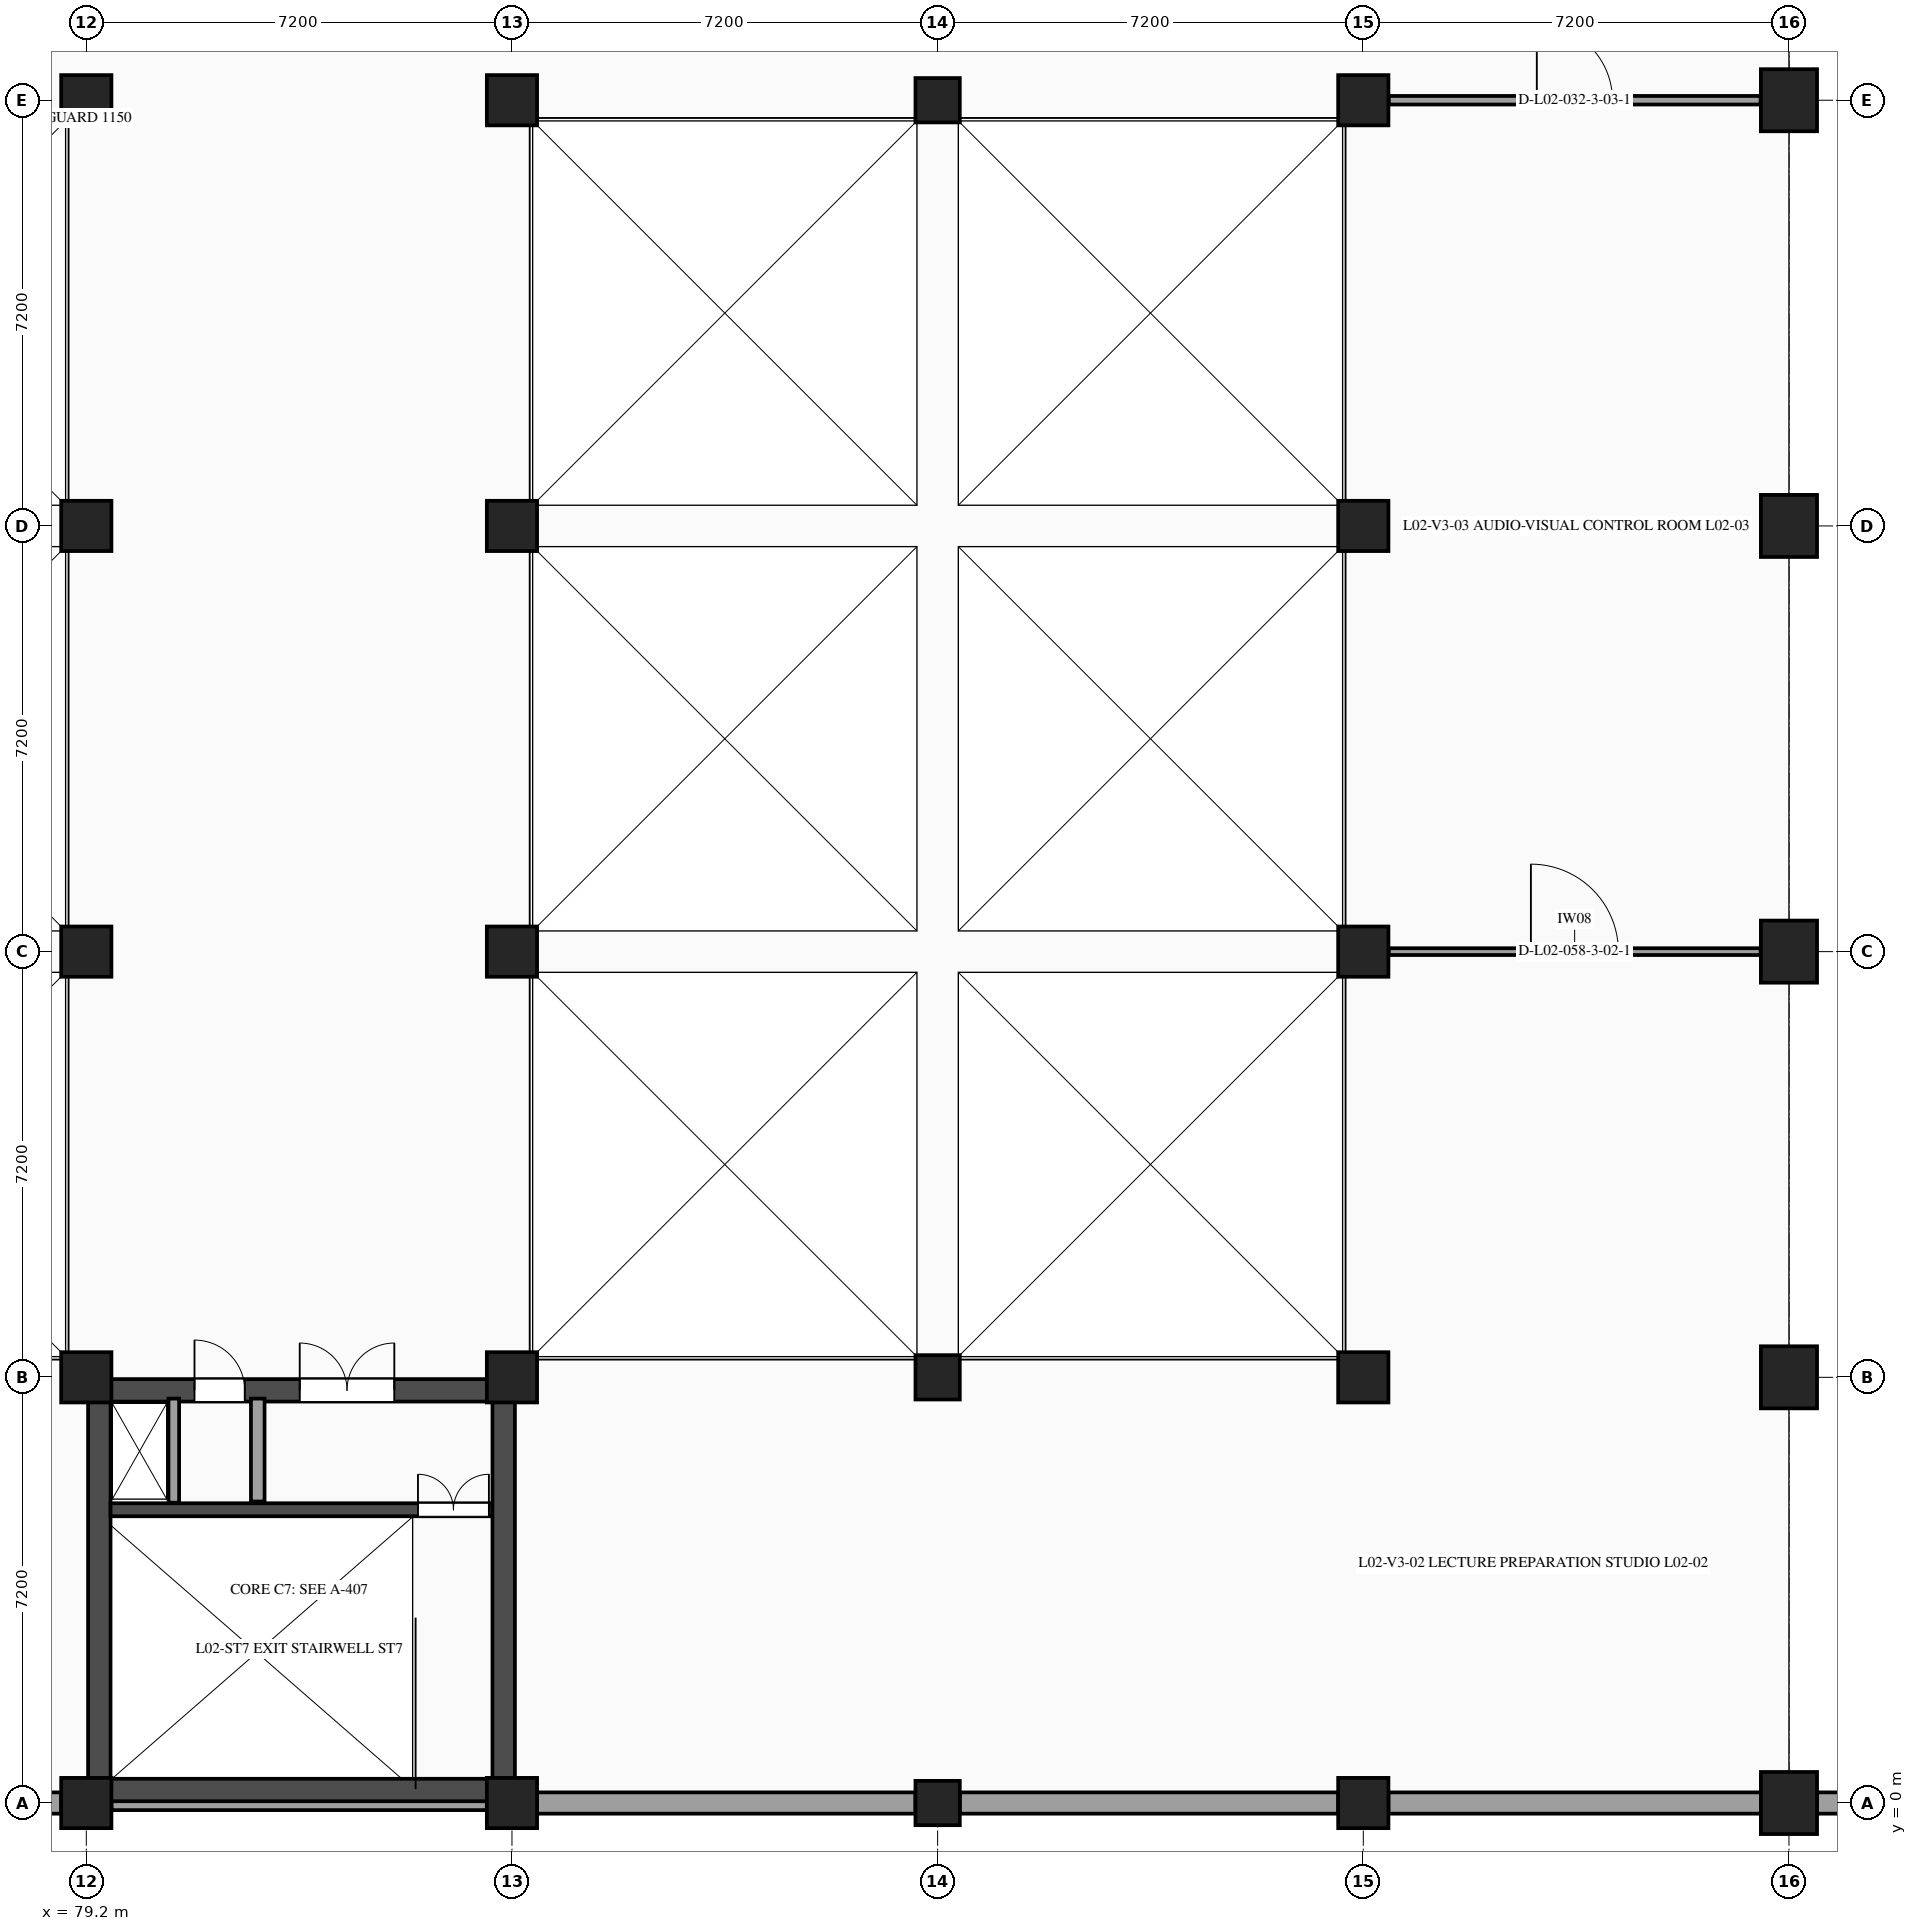
"""IFC4 building model, lengths in metres.
Left out: names, types, materials, properties, quantities, classifications, styles, units other than length and angle.
Written with IfcOpenShell. Run it as: python <this file> out.ifc"""

import sys

from ifc_helpers import new_model, si_unit, direction, frame, frame_2d, origin, origin_2d, place, context, subcontext, project, spatial, rectangle, extrude, element, fill, save


model = new_model("IFC4")
c1 = context("Model", 3, precision=1e-05, world=origin(), true_north=direction((0.0, 1.0)))
c2 = subcontext(c1, "Body", "Model", "MODEL_VIEW")
j1 = project(units=[si_unit("LENGTHUNIT", "METRE"), si_unit("PLANEANGLEUNIT", "RADIAN")], contexts=[c1])
p1 = place(None, origin())
s1 = spatial("IfcSite", under=j1, at=p1, CompositionType="ELEMENT")
p2 = place(p1, origin())
s2 = spatial("IfcBuilding", under=s1, at=p2, CompositionType="ELEMENT")
p3 = place(p2, frame((0.0, 0.0, 9.9)))
s3 = spatial("IfcBuildingStorey", under=s2, at=p3, CompositionType="ELEMENT", Elevation=9.9)
for number, where, z_axis, x_axis in (
    (1, (79.2, 0.0, 0.0), (0.0, 0.0, 1.0), (1.0, 0.0, 0.0)),
    (2, (79.2, 7.2, 0.0), (0.0, 0.0, 1.0), (1.0, 0.0, 0.0)),
    (3, (79.2, 14.4, 0.0), (0.0, 0.0, 1.0), (1.0, 0.0, 0.0)),
    (4, (79.2, 21.6, 0.0), (0.0, 0.0, 1.0), (1.0, 0.0, 0.0)),
    (5, (79.2, 28.8, 0.0), (0.0, 0.0, 1.0), (1.0, 0.0, 0.0)),
    (6, (86.4, 0.0, 0.0), (0.0, 0.0, 1.0), (1.0, 0.0, 0.0)),
    (7, (86.4, 7.2, 0.0), (0.0, 0.0, 1.0), (1.0, 0.0, 0.0)),
    (8, (86.4, 14.4, 0.0), (0.0, 0.0, 1.0), (1.0, 0.0, 0.0)),
    (9, (86.4, 21.6, 0.0), (0.0, 0.0, 1.0), (1.0, 0.0, 0.0)),
    (10, (86.4, 28.8, 0.0), (0.0, 0.0, 1.0), (1.0, 0.0, 0.0)),
):
    element("IfcColumn", number, at=place(p3, frame(where, z_axis=z_axis, x_axis=x_axis)), inside=s3, PredefinedType="COLUMN", context=c2, shape_type="SweptSolid", body=[
        extrude(rectangle(XDim=0.85, YDim=0.85, at=origin_2d()), origin(), (0.0, 0.0, 1.0), 4.5),
    ])
for number, where, z_axis, x_axis in (
    (11, (93.6, 0.0, 0.0), (0.0, 0.0, 1.0), (1.0, 0.0, 0.0)),
    (12, (93.6, 7.2, 0.0), (0.0, 0.0, 1.0), (1.0, 0.0, 0.0)),
    (13, (93.6, 28.8, 0.0), (0.0, 0.0, 1.0), (1.0, 0.0, 0.0)),
):
    element("IfcColumn", number, at=place(p3, frame(where, z_axis=z_axis, x_axis=x_axis)), inside=s3, PredefinedType="COLUMN", context=c2, shape_type="SweptSolid", body=[
        extrude(rectangle(XDim=0.75, YDim=0.75, at=origin_2d()), origin(), (0.0, 0.0, 1.0), 4.5),
    ])
for number, where, z_axis, x_axis in (
    (14, (100.8, 0.0, 0.0), (0.0, 0.0, 1.0), (1.0, 0.0, 0.0)),
    (15, (100.8, 7.2, 0.0), (0.0, 0.0, 1.0), (1.0, 0.0, 0.0)),
    (16, (100.8, 14.4, 0.0), (0.0, 0.0, 1.0), (1.0, 0.0, 0.0)),
    (17, (100.8, 21.6, 0.0), (0.0, 0.0, 1.0), (1.0, 0.0, 0.0)),
    (18, (100.8, 28.8, 0.0), (0.0, 0.0, 1.0), (1.0, 0.0, 0.0)),
):
    element("IfcColumn", number, at=place(p3, frame(where, z_axis=z_axis, x_axis=x_axis)), inside=s3, PredefinedType="COLUMN", context=c2, shape_type="SweptSolid", body=[
        extrude(rectangle(XDim=0.85, YDim=0.85, at=origin_2d()), origin(), (0.0, 0.0, 1.0), 4.5),
    ])
for number, where, z_axis, x_axis in (
    (19, (108.0, 0.0, 0.0), (0.0, 0.0, 1.0), (1.0, 0.0, 0.0)),
    (20, (108.0, 7.2, 0.0), (0.0, 0.0, 1.0), (1.0, 0.0, 0.0)),
    (21, (108.0, 14.4, 0.0), (0.0, 0.0, 1.0), (1.0, 0.0, 0.0)),
    (22, (108.0, 21.6, 0.0), (0.0, 0.0, 1.0), (1.0, 0.0, 0.0)),
    (23, (108.0, 28.8, 0.0), (0.0, 0.0, 1.0), (1.0, 0.0, 0.0)),
):
    element("IfcColumn", number, at=place(p3, frame(where, z_axis=z_axis, x_axis=x_axis)), inside=s3, PredefinedType="COLUMN", context=c2, shape_type="SweptSolid", body=[
        extrude(rectangle(XDim=0.95, YDim=1.05, at=origin_2d()), origin(), (0.0, 0.0, 1.0), 4.5),
    ])
p4 = place(p3, frame((114.7, 0.0, 0.0), z_axis=(0.0, 0.0, 1.0), x_axis=(-1.0, 0.0, 0.0)))
e24 = element("IfcWall", 24, at=p4, inside=s3, PredefinedType="STANDARD", context=c2, shape_type="SweptSolid", body=[
    extrude(rectangle(XDim=6.225, YDim=0.36, at=frame_2d((3.112, 0.0))), origin(), (0.0, 0.0, 1.0), 3.745),
])
p5 = place(p4, frame((0.413, 0.0, 1.05)))
e25 = element("IfcOpeningElement", 25, at=p5, cuts=e24, PredefinedType="OPENING", context=c2, shape_type="SweptSolid", body=[
    extrude(rectangle(XDim=5.4, YDim=1.9, at=frame_2d((2.7, 0.95))), frame((0.0, 0.19, 0.0), z_axis=(0.0, -1.0, 0.0), x_axis=(1.0, 0.0, 0.0)), (0.0, 0.0, 1.0), 0.38),
])
p6 = place(p3, frame((107.525, 0.0, 0.0), z_axis=(0.0, 0.0, 1.0), x_axis=(-1.0, 0.0, 0.0)))
e26 = element("IfcWall", 26, at=p6, inside=s3, PredefinedType="STANDARD", context=c2, shape_type="SweptSolid", body=[
    extrude(rectangle(XDim=6.3, YDim=0.36, at=frame_2d((3.15, 0.0))), origin(), (0.0, 0.0, 1.0), 3.745),
])
p7 = place(p3, frame((100.375, 0.0, 0.0), z_axis=(0.0, 0.0, 1.0), x_axis=(-1.0, 0.0, 0.0)))
e27 = element("IfcWall", 27, at=p7, inside=s3, PredefinedType="STANDARD", context=c2, shape_type="SweptSolid", body=[
    extrude(rectangle(XDim=6.4, YDim=0.36, at=frame_2d((3.2, 0.0))), origin(), (0.0, 0.0, 1.0), 3.745),
])
p8 = place(p3, frame((93.225, 0.0, 0.0), z_axis=(0.0, 0.0, 1.0), x_axis=(-1.0, 0.0, 0.0)))
e28 = element("IfcWall", 28, at=p8, inside=s3, PredefinedType="STANDARD", context=c2, shape_type="SweptSolid", body=[
    extrude(rectangle(XDim=6.4, YDim=0.36, at=frame_2d((3.2, 0.0))), origin(), (0.0, 0.0, 1.0), 3.745),
])
p9 = place(p3, frame((85.975, 0.0, 0.0), z_axis=(0.0, 0.0, 1.0), x_axis=(-1.0, 0.0, 0.0)))
e29 = element("IfcWall", 29, at=p9, inside=s3, PredefinedType="STANDARD", context=c2, shape_type="SweptSolid", body=[
    extrude(rectangle(XDim=6.35, YDim=0.24, at=frame_2d((3.175, 0.0))), origin(), (0.0, 0.0, 1.0), 3.745),
])
p10 = place(p3, frame((78.775, 0.0, 0.0), z_axis=(0.0, 0.0, 1.0), x_axis=(-1.0, 0.0, 0.0)))
e30 = element("IfcWall", 30, at=p10, inside=s3, PredefinedType="STANDARD", context=c2, shape_type="SweptSolid", body=[
    extrude(rectangle(XDim=6.4, YDim=0.36, at=frame_2d((3.2, 0.0))), origin(), (0.0, 0.0, 1.0), 3.745),
])
p11 = place(p3, frame((79.61, 0.22, 0.0), z_axis=(0.0, 0.0, 1.0), x_axis=(1.0, 0.0, 0.0)))
e31 = element("IfcWall", 31, at=p11, inside=s3, PredefinedType="SHEAR", context=c2, shape_type="SweptSolid", body=[
    extrude(rectangle(XDim=6.46, YDim=0.38, at=frame_2d((3.23, 0.0))), origin(), (0.0, 0.0, 1.0), 4.48),
])
p12 = place(p3, frame((79.42, 7.17, 0.0), z_axis=(0.0, 0.0, 1.0), x_axis=(0.0, -1.0, 0.0)))
e32 = element("IfcWall", 32, at=p12, inside=s3, PredefinedType="SHEAR", context=c2, shape_type="SweptSolid", body=[
    extrude(rectangle(XDim=7.14, YDim=0.38, at=frame_2d((3.57, 0.0))), origin(), (0.0, 0.0, 1.0), 4.48),
])
p13 = place(p3, frame((79.61, 6.98, 0.0), z_axis=(0.0, 0.0, 1.0), x_axis=(1.0, 0.0, 0.0)))
e33 = element("IfcWall", 33, at=p13, inside=s3, PredefinedType="SHEAR", context=c2, shape_type="SweptSolid", body=[
    extrude(rectangle(XDim=6.46, YDim=0.38, at=frame_2d((3.23, 0.0))), origin(), (0.0, 0.0, 1.0), 4.48),
])
p14 = place(p13, frame((1.42, 0.0, 0.0)))
e34 = element("IfcOpeningElement", 34, at=p14, cuts=e33, PredefinedType="OPENING", context=c2, shape_type="SweptSolid", body=[
    extrude(rectangle(XDim=0.85, YDim=2.1, at=frame_2d((0.425, 1.05))), frame((0.0, 0.2, 0.0), z_axis=(0.0, -1.0, 0.0), x_axis=(1.0, 0.0, 0.0)), (0.0, 0.0, 1.0), 0.4),
])
p15 = place(p13, frame((3.2, 0.0, 0.0)))
e35 = element("IfcOpeningElement", 35, at=p15, cuts=e33, PredefinedType="OPENING", context=c2, shape_type="SweptSolid", body=[
    extrude(rectangle(XDim=1.6, YDim=2.2, at=frame_2d((0.8, 1.1))), frame((0.0, 0.2, 0.0), z_axis=(0.0, -1.0, 0.0), x_axis=(1.0, 0.0, 0.0)), (0.0, 0.0, 1.0), 0.4),
])
p16 = place(p3, frame((79.61, 4.96, 0.0), z_axis=(0.0, 0.0, 1.0), x_axis=(1.0, 0.0, 0.0)))
e36 = element("IfcWall", 36, at=p16, inside=s3, PredefinedType="SHEAR", context=c2, shape_type="SweptSolid", body=[
    extrude(rectangle(XDim=6.46, YDim=0.22, at=frame_2d((3.23, 0.0))), origin(), (0.0, 0.0, 1.0), 4.48),
])
p17 = place(p16, frame((5.2, 0.0, 0.0)))
e37 = element("IfcOpeningElement", 37, at=p17, cuts=e36, PredefinedType="OPENING", context=c2, shape_type="SweptSolid", body=[
    extrude(rectangle(XDim=1.2, YDim=2.2, at=frame_2d((0.6, 1.1))), frame((0.0, 0.12, 0.0), z_axis=(0.0, -1.0, 0.0), x_axis=(1.0, 0.0, 0.0)), (0.0, 0.0, 1.0), 0.24),
])
p18 = place(p3, frame((82.1, 5.1, 0.0), z_axis=(0.0, 0.0, 1.0), x_axis=(0.0, 1.0, 0.0)))
e38 = element("IfcWall", 38, at=p18, inside=s3, PredefinedType="PARTITIONING", context=c2, shape_type="SweptSolid", body=[
    extrude(rectangle(XDim=1.74, YDim=0.23, at=frame_2d((0.87, 0.0))), origin(), (0.0, 0.0, 1.0), 4.48),
])
p19 = place(p3, frame((80.68, 5.08, 0.0), z_axis=(0.0, 0.0, 1.0), x_axis=(0.0, 1.0, 0.0)))
e39 = element("IfcWall", 39, at=p19, inside=s3, PredefinedType="PARTITIONING", context=c2, shape_type="SweptSolid", body=[
    extrude(rectangle(XDim=1.76, YDim=0.18, at=frame_2d((0.88, 0.0))), origin(), (0.0, 0.0, 1.0), 4.48),
])
p20 = place(p3, frame((86.26, 0.03, 0.0), z_axis=(0.0, 0.0, 1.0), x_axis=(0.0, 1.0, 0.0)))
e40 = element("IfcWall", 40, at=p20, inside=s3, PredefinedType="SHEAR", context=c2, shape_type="SweptSolid", body=[
    extrude(rectangle(XDim=7.14, YDim=0.38, at=frame_2d((3.57, 0.0))), origin(), (0.0, 0.0, 1.0), 4.48),
])
p21 = place(p3, frame((101.23, 14.4, 0.0), z_axis=(0.0, 0.0, 1.0), x_axis=(1.0, 0.0, 0.0)))
e41 = element("IfcWall", 41, at=p21, inside=s3, PredefinedType="PARTITIONING", context=c2, shape_type="SweptSolid", body=[
    extrude(rectangle(XDim=6.29, YDim=0.115, at=frame_2d((3.145, 0.0))), origin(), (0.0, 0.0, 1.0), 3.84),
])
p22 = place(p21, frame((2.405, 0.0, 0.0)))
e42 = element("IfcOpeningElement", 42, at=p22, cuts=e41, PredefinedType="OPENING", context=c2, shape_type="SweptSolid", body=[
    extrude(rectangle(XDim=1.48, YDim=2.28, at=frame_2d((0.74, 1.14))), frame((0.0, 0.067, 0.0), z_axis=(0.0, -1.0, 0.0), x_axis=(1.0, 0.0, 0.0)), (0.0, 0.0, 1.0), 0.135),
])
p23 = place(p3, frame((101.23, 28.8, 0.0), z_axis=(0.0, 0.0, 1.0), x_axis=(1.0, 0.0, 0.0)))
e43 = element("IfcWall", 43, at=p23, inside=s3, PredefinedType="PARTITIONING", context=c2, shape_type="SweptSolid", body=[
    extrude(rectangle(XDim=6.29, YDim=0.145, at=frame_2d((3.145, 0.0))), origin(), (0.0, 0.0, 1.0), 3.84),
])
p24 = place(p23, frame((2.505, 0.0, 0.0)))
e44 = element("IfcOpeningElement", 44, at=p24, cuts=e43, PredefinedType="OPENING", context=c2, shape_type="SweptSolid", body=[
    extrude(rectangle(XDim=1.28, YDim=2.24, at=frame_2d((0.64, 1.12))), frame((0.0, 0.083, 0.0), z_axis=(0.0, -1.0, 0.0), x_axis=(1.0, 0.0, 0.0)), (0.0, 0.0, 1.0), 0.165),
])
p25 = place(p14, origin())
e45 = element("IfcDoor", 45, at=p25, inside=s3, OperationType="SINGLE_SWING_LEFT", PredefinedType="DOOR", context=c2, shape_type="SweptSolid", body=[
    extrude(rectangle(XDim=0.85, YDim=2.1, at=frame_2d((0.425, 1.05))), frame((0.0, 0.025, 0.0), z_axis=(0.0, -1.0, 0.0), x_axis=(1.0, 0.0, 0.0)), (0.0, 0.0, 1.0), 0.05),
])
fill(e34, e45)
p26 = place(p17, origin())
e46 = element("IfcDoor", 46, at=p26, inside=s3, OperationType="DOUBLE_DOOR_SINGLE_SWING", PredefinedType="DOOR", context=c2, shape_type="SweptSolid", body=[
    extrude(rectangle(XDim=1.2, YDim=2.2, at=frame_2d((0.6, 1.1))), frame((0.0, 0.025, 0.0), z_axis=(0.0, -1.0, 0.0), x_axis=(1.0, 0.0, 0.0)), (0.0, 0.0, 1.0), 0.05),
])
fill(e37, e46)
p27 = place(p15, frame((1.6, 0.0, 0.0), z_axis=(0.0, 0.0, 1.0), x_axis=(-1.0, 0.0, 0.0)))
e47 = element("IfcDoor", 47, at=p27, inside=s3, OperationType="DOUBLE_DOOR_SINGLE_SWING", PredefinedType="DOOR", context=c2, shape_type="SweptSolid", body=[
    extrude(rectangle(XDim=1.6, YDim=2.2, at=frame_2d((0.8, 1.1))), frame((0.0, 0.025, 0.0), z_axis=(0.0, -1.0, 0.0), x_axis=(1.0, 0.0, 0.0)), (0.0, 0.0, 1.0), 0.05),
])
fill(e35, e47)
p28 = place(p24, origin())
e48 = element("IfcDoor", 48, at=p28, inside=s3, OperationType="SINGLE_SWING_LEFT", PredefinedType="DOOR", context=c2, shape_type="SweptSolid", body=[
    extrude(rectangle(XDim=1.28, YDim=2.24, at=frame_2d((0.64, 1.12))), frame((0.0, 0.025, 0.0), z_axis=(0.0, -1.0, 0.0), x_axis=(1.0, 0.0, 0.0)), (0.0, 0.0, 1.0), 0.05),
])
fill(e44, e48)
p29 = place(p22, origin())
e49 = element("IfcDoor", 49, at=p29, inside=s3, OperationType="SINGLE_SWING_LEFT", PredefinedType="DOOR", context=c2, shape_type="SweptSolid", body=[
    extrude(rectangle(XDim=1.48, YDim=2.28, at=frame_2d((0.74, 1.14))), frame((0.0, 0.025, 0.0), z_axis=(0.0, -1.0, 0.0), x_axis=(1.0, 0.0, 0.0)), (0.0, 0.0, 1.0), 0.05),
])
fill(e42, e49)
save(model, sys.argv[1])
